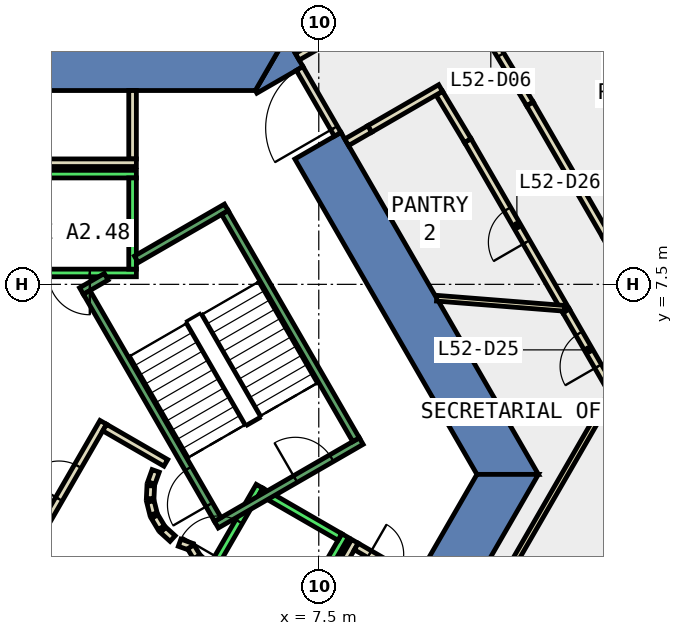
"""IFC4 building model, lengths in metres.
Left out: names, types, materials, properties, quantities, classifications, styles, units other than length and angle.
Written with IfcOpenShell. Run it as: python <this file> out.ifc"""

import sys

from ifc_helpers import new_model, si_unit, direction, frame, frame_2d, origin, place, context, subcontext, project, spatial, polyline, rectangle, outline, extrude, element, fill, save


model = new_model("IFC4")
c1 = context("Model", 3, precision=1e-05, world=origin(), true_north=direction((0.0, 1.0)))
c2 = subcontext(c1, "Body", "Model", "MODEL_VIEW")
j1 = project(units=[si_unit("LENGTHUNIT", "METRE"), si_unit("PLANEANGLEUNIT", "RADIAN")], contexts=[c1])
p1 = place(None, origin())
s1 = spatial("IfcSite", under=j1, at=p1, CompositionType="ELEMENT")
p2 = place(p1, origin())
s2 = spatial("IfcBuilding", under=s1, at=p2, CompositionType="ELEMENT")
p3 = place(p2, frame((0.0, 0.0, 231.8)))
s3 = spatial("IfcBuildingStorey", under=s2, at=p3, CompositionType="ELEMENT", Elevation=231.8)
p4 = place(p3, frame((0.0, 0.0, -0.4)))
e1 = element("IfcWall", 1, at=p4, inside=s3, PredefinedType="SHEAR", context=c2, shape_type="SweptSolid", body=[
    extrude(outline(polyline([(8.084, 11.498), (6.871, 10.798), (11.662, 2.5), (13.279, 2.5), (8.084, 11.498)])), origin(), (0.0, 0.0, 1.0), 4.0),
])
p5 = place(p3, frame((0.0, 0.0, -0.4)))
e2 = element("IfcWall", 2, at=p5, inside=s3, PredefinedType="SHEAR", context=c2, shape_type="SweptSolid", body=[
    extrude(outline(polyline([(5.871, 12.53), (7.084, 13.23), (6.64, 14.0), (5.831, 12.6), (5.871, 12.53)])), origin(), (0.0, 0.0, 1.0), 4.0),
])
p6 = place(p3, frame((0.0, 0.0, -0.4)))
e3 = element("IfcWall", 3, at=p6, inside=s3, PredefinedType="SHEAR", context=c2, shape_type="SweptSolid", body=[
    extrude(outline(polyline([(6.64, 14.0), (-6.64, 14.0), (-5.831, 12.6), (5.831, 12.6), (6.64, 14.0)])), origin(), (0.0, 0.0, 1.0), 4.0),
])
p7 = place(p3, frame((0.0, 0.0, -0.4)))
e4 = element("IfcWall", 4, at=p7, inside=s3, PredefinedType="SHEAR", context=c2, shape_type="SweptSolid", body=[
    extrude(outline(polyline([(6.64, -9.0), (13.279, 2.5), (11.662, 2.5), (5.831, -7.6), (6.64, -9.0)])), origin(), (0.0, 0.0, 1.0), 4.0),
])
p8 = place(p3, frame((15.194, 4.747, 0.0), z_axis=(0.0, 0.0, 1.0), x_axis=(-0.500140598757, 0.865944213836, 0.0)))
e5 = element("IfcWall", 5, at=p8, inside=s3, PredefinedType="PARTITIONING", context=c2, shape_type="SweptSolid", body=[
    extrude(rectangle(XDim=2.375, YDim=0.2, at=frame_2d((1.188, 0.0))), origin(), (0.0, 0.0, 1.0), 3.6),
])
p9 = place(p8, frame((0.688, 0.0, 0.0)))
e6 = element("IfcOpeningElement", 6, at=p9, cuts=e5, PredefinedType="OPENING", context=c2, shape_type="SweptSolid", body=[
    extrude(rectangle(XDim=1.0, YDim=2.1, at=frame_2d((0.5, 1.05))), frame((0.0, 0.11, 0.0), z_axis=(0.0, -1.0, 0.0), x_axis=(1.0, 0.0, 0.0)), (0.0, 0.0, 1.0), 0.22),
])
p10 = place(p3, frame((14.006, 6.804, 0.0), z_axis=(0.0, 0.0, 1.0), x_axis=(-0.500032993936, 0.866006353889, 0.0)))
e7 = element("IfcWall", 7, at=p10, inside=s3, PredefinedType="PARTITIONING", context=c2, shape_type="SweptSolid", body=[
    extrude(rectangle(XDim=5.172, YDim=0.2, at=frame_2d((2.586, 0.0))), origin(), (0.0, 0.0, 1.0), 3.6),
])
p11 = place(p10, frame((2.086, 0.0, 0.0)))
e8 = element("IfcOpeningElement", 8, at=p11, cuts=e7, PredefinedType="OPENING", context=c2, shape_type="SweptSolid", body=[
    extrude(rectangle(XDim=1.0, YDim=2.1, at=frame_2d((0.5, 1.05))), frame((0.0, 0.11, 0.0), z_axis=(0.0, -1.0, 0.0), x_axis=(1.0, 0.0, 0.0)), (0.0, 0.0, 1.0), 0.22),
])
p12 = place(p3, frame((11.42, 11.283, 0.0), z_axis=(0.0, 0.0, 1.0), x_axis=(-0.514890585899, 0.857255903772, 0.0)))
e9 = element("IfcWall", 9, at=p12, inside=s3, PredefinedType="PARTITIONING", context=c2, shape_type="SweptSolid", body=[
    extrude(rectangle(XDim=1.455, YDim=0.2, at=frame_2d((0.728, 0.0))), origin(), (0.0, 0.0, 1.0), 3.6),
])
p13 = place(p3, frame((10.706, 12.666, 0.0), z_axis=(0.0, 0.0, 1.0), x_axis=(-0.865862892194, -0.50028137275, 0.0)))
e10 = element("IfcWall", 10, at=p13, inside=s3, PredefinedType="PARTITIONING", context=c2, shape_type="SweptSolid", body=[
    extrude(rectangle(XDim=2.155, YDim=0.2, at=frame_2d((1.078, 0.0))), origin(), (0.0, 0.0, 1.0), 3.6),
])
p14 = place(p3, frame((6.935, 13.488, 0.0), z_axis=(0.0, 0.0, 1.0), x_axis=(0.866022890907, 0.500004352405, 0.0)))
e11 = element("IfcWall", 11, at=p14, inside=s3, PredefinedType="PARTITIONING", context=c2, shape_type="SweptSolid", body=[
    extrude(rectangle(XDim=0.7, YDim=0.2, at=frame_2d((0.35, 0.0))), origin(), (0.0, 0.0, 1.0), 2.4),
])
p15 = place(p3, frame((10.996, 15.679, 0.0), z_axis=(0.0, 0.0, 1.0), x_axis=(0.514800663461, -0.857309907152, 0.0)))
e12 = element("IfcWall", 12, at=p15, inside=s3, PredefinedType="PARTITIONING", context=c2, shape_type="SweptSolid", body=[
    extrude(rectangle(XDim=4.003, YDim=0.2, at=frame_2d((2.001, 0.0))), origin(), (0.0, 0.0, 1.0), 3.6),
])
p16 = place(p15, frame((1.502, 0.0, 0.0)))
e13 = element("IfcOpeningElement", 13, at=p16, cuts=e12, PredefinedType="OPENING", context=c2, shape_type="SweptSolid", body=[
    extrude(rectangle(XDim=1.0, YDim=2.1, at=frame_2d((0.5, 1.05))), frame((0.0, 0.11, 0.0), z_axis=(0.0, -1.0, 0.0), x_axis=(1.0, 0.0, 0.0)), (0.0, 0.0, 1.0), 0.22),
])
p17 = place(p3, frame((13.057, 12.247, 0.0), z_axis=(0.0, 0.0, 1.0), x_axis=(0.500093699572, -0.865971299552, 0.0)))
e14 = element("IfcWall", 14, at=p17, inside=s3, PredefinedType="PARTITIONING", context=c2, shape_type="SweptSolid", body=[
    extrude(rectangle(XDim=4.004, YDim=0.2, at=frame_2d((2.002, 0.0))), origin(), (0.0, 0.0, 1.0), 3.6),
])
p18 = place(p3, frame((2.6, 12.6, 0.0), z_axis=(0.0, 0.0, 1.0), x_axis=(0.0, -1.0, 0.0)))
e15 = element("IfcWall", 15, at=p18, inside=s3, PredefinedType="PARTITIONING", context=c2, shape_type="SweptSolid", body=[
    extrude(rectangle(XDim=1.8, YDim=0.2, at=frame_2d((0.9, 0.0))), origin(), (0.0, 0.0, 1.0), 3.6),
])
p19 = place(p3, frame((2.7, 10.7, 0.0), z_axis=(0.0, 0.0, 1.0), x_axis=(-1.0, 0.0, 0.0)))
e16 = element("IfcWall", 16, at=p19, inside=s3, PredefinedType="PARTITIONING", context=c2, shape_type="SweptSolid", body=[
    extrude(rectangle(XDim=5.4, YDim=0.2, at=frame_2d((2.7, 0.0))), origin(), (0.0, 0.0, 1.0), 3.6),
])
p20 = place(p3, frame((5.751, -3.938, 0.0), z_axis=(0.0, 0.0, 1.0), x_axis=(0.500034260056, 0.866005622828, 0.0)))
e17 = element("IfcWall", 17, at=p20, inside=s3, PredefinedType="PARTITIONING", context=c2, shape_type="SweptSolid", body=[
    extrude(rectangle(XDim=5.399, YDim=0.2, at=frame_2d((2.7, 0.0))), origin(), (0.0, 0.0, 1.0), 3.6),
])
p21 = place(p3, frame((8.488, 0.602, 0.0), z_axis=(0.0, 0.0, 1.0), x_axis=(0.86585331735, -0.500297944063, 0.0)))
e18 = element("IfcWall", 18, at=p21, inside=s3, PredefinedType="PARTITIONING", context=c2, shape_type="SweptSolid", body=[
    extrude(rectangle(XDim=1.799, YDim=0.2, at=frame_2d((0.9, 0.0))), origin(), (0.0, 0.0, 1.0), 3.6),
])
p22 = place(p21, frame((0.4, 0.0, 0.0)))
e19 = element("IfcOpeningElement", 19, at=p22, cuts=e18, PredefinedType="OPENING", context=c2, shape_type="SweptSolid", body=[
    extrude(rectangle(XDim=0.9, YDim=2.1, at=frame_2d((0.45, 1.05))), frame((0.0, 0.11, 0.0), z_axis=(0.0, -1.0, 0.0), x_axis=(1.0, 0.0, 0.0)), (0.0, 0.0, 1.0), 0.22),
])
p23 = place(p3, frame((10.604, 7.135, 0.0), z_axis=(0.0, 0.0, 1.0), x_axis=(0.996887536909, -0.07883678555, 0.0)))
e20 = element("IfcWall", 20, at=p23, inside=s3, PredefinedType="PARTITIONING", context=c2, shape_type="SweptSolid", body=[
    extrude(rectangle(XDim=3.375, YDim=0.15, at=frame_2d((1.688, 0.0))), origin(), (0.0, 0.0, 1.0), 3.6),
])
p24 = place(p3, frame((0.05, 0.787, 0.0), z_axis=(0.0, 0.0, 1.0), x_axis=(0.499954076797, 0.866051915934, 0.0)))
e21 = element("IfcWall", 21, at=p24, inside=s3, PredefinedType="PARTITIONING", context=c2, shape_type="SweptSolid", body=[
    extrude(rectangle(XDim=3.558, YDim=0.2, at=frame_2d((1.779, 0.0))), origin(), (0.0, 0.0, 1.0), 3.6),
])
p25 = place(p24, frame((1.229, 0.0, 0.0)))
e22 = element("IfcOpeningElement", 22, at=p25, cuts=e21, PredefinedType="OPENING", context=c2, shape_type="SweptSolid", body=[
    extrude(rectangle(XDim=1.0, YDim=2.1, at=frame_2d((0.5, 1.05))), frame((0.0, 0.11, 0.0), z_axis=(0.0, -1.0, 0.0), x_axis=(1.0, 0.0, 0.0)), (0.0, 0.0, 1.0), 0.22),
])
p26 = place(p3, frame((1.866, 3.732, 0.0), z_axis=(0.0, 0.0, 1.0), x_axis=(0.866043361281, -0.499968895414, 0.0)))
e23 = element("IfcWall", 23, at=p26, inside=s3, PredefinedType="PARTITIONING", context=c2, shape_type="SweptSolid", body=[
    extrude(rectangle(XDim=1.858, YDim=0.2, at=frame_2d((0.929, 0.0))), origin(), (0.0, 0.0, 1.0), 3.6),
])
p27 = place(p3, frame((3.208, 2.592, 0.0), z_axis=(0.0, 0.0, 1.0), x_axis=(-0.337388820924, -0.941365382578, 0.0)))
e24 = element("IfcWall", 24, at=p27, inside=s3, PredefinedType="PARTITIONING", context=c2, shape_type="SweptSolid", body=[
    extrude(rectangle(XDim=0.338, YDim=0.2, at=frame_2d((0.169, 0.0))), origin(), (0.0, 0.0, 1.0), 3.6),
])
p28 = place(p3, frame((3.079, 2.199, 0.0), z_axis=(0.0, 0.0, 1.0), x_axis=(-0.047771483479, -0.998858290933, 0.0)))
e25 = element("IfcWall", 25, at=p28, inside=s3, PredefinedType="PARTITIONING", context=c2, shape_type="SweptSolid", body=[
    extrude(rectangle(XDim=0.337, YDim=0.2, at=frame_2d((0.169, 0.0))), origin(), (0.0, 0.0, 1.0), 3.6),
])
p29 = place(p3, frame((3.07, 1.786, 0.0), z_axis=(0.0, 0.0, 1.0), x_axis=(0.242705583207, -0.970099994784, 0.0)))
e26 = element("IfcWall", 26, at=p29, inside=s3, PredefinedType="PARTITIONING", context=c2, shape_type="SweptSolid", body=[
    extrude(rectangle(XDim=0.338, YDim=0.2, at=frame_2d((0.169, 0.0))), origin(), (0.0, 0.0, 1.0), 3.6),
])
for number, where, z_axis, x_axis in (
    (27, (3.182, 1.388, 0.0), (0.0, 0.0, 1.0), (0.512, -0.859, 0.0)),
    (28, (3.404, 1.039, 0.0), (0.0, 0.0, 1.0), (0.74, -0.672, 0.0)),
):
    element("IfcWall", number, at=place(p3, frame(where, z_axis=z_axis, x_axis=x_axis)), inside=s3, PredefinedType="PARTITIONING", context=c2, shape_type="SweptSolid", body=[
        extrude(rectangle(XDim=0.338, YDim=0.2, at=frame_2d((0.169, 0.0))), origin(), (0.0, 0.0, 1.0), 3.6),
    ])
p30 = place(p3, frame((3.838, 0.702, 0.0), z_axis=(0.0, 0.0, 1.0), x_axis=(0.941035081519, -0.338308993895, 0.0)))
e29 = element("IfcWall", 29, at=p30, inside=s3, PredefinedType="PARTITIONING", context=c2, shape_type="SweptSolid", body=[
    extrude(rectangle(XDim=0.337, YDim=0.2, at=frame_2d((0.168, 0.0))), origin(), (0.0, 0.0, 1.0), 3.6),
])
p31 = place(p3, frame((4.132, 0.593, 0.0), z_axis=(0.0, 0.0, 1.0), x_axis=(0.513561617048, -0.858052717201, 0.0)))
e30 = element("IfcWall", 30, at=p31, inside=s3, PredefinedType="PARTITIONING", context=c2, shape_type="SweptSolid", body=[
    extrude(rectangle(XDim=0.308, YDim=0.2, at=frame_2d((0.154, 0.0))), origin(), (0.0, 0.0, 1.0), 3.6),
])
p32 = place(p3, frame((4.301, 0.315, 0.0), z_axis=(0.0, 0.0, 1.0), x_axis=(0.741798017506, -0.670623367639, 0.0)))
e31 = element("IfcWall", 31, at=p32, inside=s3, PredefinedType="PARTITIONING", context=c2, shape_type="SweptSolid", body=[
    extrude(rectangle(XDim=0.309, YDim=0.2, at=frame_2d((0.154, 0.0))), origin(), (0.0, 0.0, 1.0), 3.6),
])
p33 = place(p3, frame((7.997, 11.448, 0.0), z_axis=(0.0, 0.0, 1.0), x_axis=(-0.50002537861, 0.866010750942, 0.0)))
e32 = element("IfcWall", 32, at=p33, inside=s3, PredefinedType="PARTITIONING", context=c2, shape_type="SweptSolid", body=[
    extrude(rectangle(XDim=2.0, YDim=0.2, at=frame_2d((1.0, 0.0))), origin(), (0.0, 0.0, 1.0), 2.4),
])
p34 = place(p33, frame((0.19, 0.0, 0.0)))
e33 = element("IfcOpeningElement", 33, at=p34, cuts=e32, PredefinedType="OPENING", context=c2, shape_type="SweptSolid", body=[
    extrude(rectangle(XDim=1.8, YDim=2.1, at=frame_2d((0.9, 1.05))), frame((0.0, 0.11, 0.0), z_axis=(0.0, -1.0, 0.0), x_axis=(1.0, 0.0, 0.0)), (0.0, 0.0, 1.0), 0.22),
])
p35 = place(p3, frame((9.597, -5.079, 0.0), z_axis=(0.0, 0.0, 1.0), x_axis=(0.499949193323, 0.866054735046, 0.0)))
e34 = element("IfcWall", 34, at=p35, inside=s3, PredefinedType="PARTITIONING", context=c2, shape_type="SweptSolid", body=[
    extrude(rectangle(XDim=11.371, YDim=0.15, at=frame_2d((5.686, 0.0))), origin(), (0.0, 0.0, 1.0), 3.6),
])
p36 = place(p3, frame((8.84, 11.588, 0.0), z_axis=(0.0, 0.0, 1.0), x_axis=(-0.866110083249, -0.499853302173, 0.0)))
e35 = element("IfcWall", 35, at=p36, inside=s3, PredefinedType="PARTITIONING", context=c2, shape_type="SweptSolid", body=[
    extrude(rectangle(XDim=0.7, YDim=0.2, at=frame_2d((0.35, 0.0))), origin(), (0.0, 0.0, 1.0), 2.4),
])
p37 = place(p3, frame((2.7, 7.8, 0.0), z_axis=(0.0, 0.0, 1.0), x_axis=(-1.0, 0.0, 0.0)))
e36 = element("IfcWall", 36, at=p37, inside=s3, PredefinedType="STANDARD", context=c2, shape_type="SweptSolid", body=[
    extrude(rectangle(XDim=5.4, YDim=0.2, at=frame_2d((2.7, 0.0))), origin(), (0.0, 0.0, 1.0), 3.6),
])
p38 = place(p37, frame((1.225, 0.0, 0.0)))
e37 = element("IfcOpeningElement", 37, at=p38, cuts=e36, PredefinedType="OPENING", context=c2, shape_type="SweptSolid", body=[
    extrude(rectangle(XDim=1.1, YDim=2.1, at=frame_2d((0.55, 1.05))), frame((0.0, 0.11, 0.0), z_axis=(0.0, -1.0, 0.0), x_axis=(1.0, 0.0, 0.0)), (0.0, 0.0, 1.0), 0.22),
])
p39 = place(p37, frame((3.075, 0.0, 0.0)))
e38 = element("IfcOpeningElement", 38, at=p39, cuts=e36, PredefinedType="OPENING", context=c2, shape_type="SweptSolid", body=[
    extrude(rectangle(XDim=1.1, YDim=2.1, at=frame_2d((0.55, 1.05))), frame((0.0, 0.11, 0.0), z_axis=(0.0, -1.0, 0.0), x_axis=(1.0, 0.0, 0.0)), (0.0, 0.0, 1.0), 0.22),
])
p40 = place(p3, frame((2.7, 10.4, 0.0), z_axis=(0.0, 0.0, 1.0), x_axis=(-1.0, 0.0, 0.0)))
e39 = element("IfcWall", 39, at=p40, inside=s3, PredefinedType="STANDARD", context=c2, shape_type="SweptSolid", body=[
    extrude(rectangle(XDim=5.4, YDim=0.2, at=frame_2d((2.7, 0.0))), origin(), (0.0, 0.0, 1.0), 3.6),
])
p41 = place(p3, frame((2.6, 7.9, 0.0), z_axis=(0.0, 0.0, 1.0), x_axis=(0.0, 1.0, 0.0)))
e40 = element("IfcWall", 40, at=p41, inside=s3, PredefinedType="STANDARD", context=c2, shape_type="SweptSolid", body=[
    extrude(rectangle(XDim=2.4, YDim=0.2, at=frame_2d((1.2, 0.0))), origin(), (0.0, 0.0, 1.0), 3.6),
])
p42 = place(p3, frame((3.24, -2.488, 0.0), z_axis=(0.0, 0.0, 1.0), x_axis=(0.500034260056, 0.866005622828, 0.0)))
e41 = element("IfcWall", 41, at=p42, inside=s3, PredefinedType="STANDARD", context=c2, shape_type="SweptSolid", body=[
    extrude(rectangle(XDim=5.399, YDim=0.2, at=frame_2d((2.7, 0.0))), origin(), (0.0, 0.0, 1.0), 3.6),
])
p43 = place(p42, frame((3.225, 0.0, 0.0)))
e42 = element("IfcOpeningElement", 42, at=p43, cuts=e41, PredefinedType="OPENING", context=c2, shape_type="SweptSolid", body=[
    extrude(rectangle(XDim=1.1, YDim=2.1, at=frame_2d((0.55, 1.05))), frame((0.0, 0.11, 0.0), z_axis=(0.0, -1.0, 0.0), x_axis=(1.0, 0.0, 0.0)), (0.0, 0.0, 1.0), 0.22),
])
p44 = place(p42, frame((1.225, 0.0, 0.0)))
e43 = element("IfcOpeningElement", 43, at=p44, cuts=e41, PredefinedType="OPENING", context=c2, shape_type="SweptSolid", body=[
    extrude(rectangle(XDim=1.1, YDim=2.1, at=frame_2d((0.55, 1.05))), frame((0.0, 0.11, 0.0), z_axis=(0.0, -1.0, 0.0), x_axis=(1.0, 0.0, 0.0)), (0.0, 0.0, 1.0), 0.22),
])
p45 = place(p3, frame((5.492, -3.788, 0.0), z_axis=(0.0, 0.0, 1.0), x_axis=(0.500034260056, 0.866005622828, 0.0)))
e44 = element("IfcWall", 44, at=p45, inside=s3, PredefinedType="STANDARD", context=c2, shape_type="SweptSolid", body=[
    extrude(rectangle(XDim=5.399, YDim=0.2, at=frame_2d((2.7, 0.0))), origin(), (0.0, 0.0, 1.0), 3.6),
])
p46 = place(p3, frame((5.977, 2.052, 0.0), z_axis=(0.0, 0.0, 1.0), x_axis=(0.865973769406, -0.500089422704, 0.0)))
e45 = element("IfcWall", 45, at=p46, inside=s3, PredefinedType="STANDARD", context=c2, shape_type="SweptSolid", body=[
    extrude(rectangle(XDim=2.399, YDim=0.2, at=frame_2d((1.2, 0.0))), origin(), (0.0, 0.0, 1.0), 3.6),
])
p47 = place(p3, frame((4.806, 1.176, 0.0), z_axis=(0.0, 0.0, 1.0), x_axis=(0.866059941101, 0.499940174841, 0.0)))
e46 = element("IfcWall", 46, at=p47, inside=s3, PredefinedType="STANDARD", context=c2, shape_type="SweptSolid", body=[
    extrude(rectangle(XDim=4.4, YDim=0.2, at=frame_2d((2.2, 0.0))), origin(), (0.0, 0.0, 1.0), 3.6),
])
p48 = place(p47, frame((2.4, 0.0, 0.0)))
e47 = element("IfcOpeningElement", 47, at=p48, cuts=e46, PredefinedType="OPENING", context=c2, shape_type="SweptSolid", body=[
    extrude(rectangle(XDim=1.1, YDim=2.2, at=frame_2d((0.55, 1.1))), frame((0.0, 0.11, 0.0), z_axis=(0.0, -1.0, 0.0), x_axis=(1.0, 0.0, 0.0)), (0.0, 0.0, 1.0), 0.22),
])
p49 = place(p3, frame((2.7, 8.158, 0.0), z_axis=(0.0, 0.0, 1.0), x_axis=(0.86611865017, 0.499838457731, 0.0)))
e48 = element("IfcWall", 48, at=p49, inside=s3, PredefinedType="STANDARD", context=c2, shape_type="SweptSolid", body=[
    extrude(rectangle(XDim=2.733, YDim=0.2, at=frame_2d((1.366, 0.0))), origin(), (0.0, 0.0, 1.0), 3.6),
])
p50 = place(p3, frame((1.256, 7.324, 0.0), z_axis=(0.0, 0.0, 1.0), x_axis=(0.865915093549, 0.500191014278, 0.0)))
e49 = element("IfcWall", 49, at=p50, inside=s3, PredefinedType="STANDARD", context=c2, shape_type="SweptSolid", body=[
    extrude(rectangle(XDim=0.752, YDim=0.2, at=frame_2d((0.376, 0.0))), origin(), (0.0, 0.0, 1.0), 3.6),
])
p51 = place(p3, frame((4.843, 1.312, 0.0), z_axis=(0.0, 0.0, 1.0), x_axis=(-0.499963383562, 0.866046543262, 0.0)))
e50 = element("IfcWall", 50, at=p51, inside=s3, PredefinedType="STANDARD", context=c2, shape_type="SweptSolid", body=[
    extrude(rectangle(XDim=6.9, YDim=0.2, at=frame_2d((3.45, 0.0))), origin(), (0.0, 0.0, 1.0), 3.6),
])
p52 = place(p51, frame((0.45, 0.0, 0.0)))
e51 = element("IfcOpeningElement", 51, at=p52, cuts=e50, PredefinedType="OPENING", context=c2, shape_type="SweptSolid", body=[
    extrude(rectangle(XDim=1.1, YDim=2.2, at=frame_2d((0.55, 1.1))), frame((0.0, 0.11, 0.0), z_axis=(0.0, -1.0, 0.0), x_axis=(1.0, 0.0, 0.0)), (0.0, 0.0, 1.0), 0.22),
])
p53 = place(p3, frame((8.48, 3.412, 0.0), z_axis=(0.0, 0.0, 1.0), x_axis=(-0.499978703459, 0.866037698999, 0.0)))
e52 = element("IfcWall", 52, at=p53, inside=s3, PredefinedType="STANDARD", context=c2, shape_type="SweptSolid", body=[
    extrude(rectangle(XDim=6.9, YDim=0.2, at=frame_2d((3.45, 0.0))), origin(), (0.0, 0.0, 1.0), 3.6),
])
p54 = place(p16, origin())
e53 = element("IfcDoor", 53, at=p54, inside=s3, OperationType="SINGLE_SWING_LEFT", PredefinedType="DOOR", context=c2, shape_type="SweptSolid", body=[
    extrude(rectangle(XDim=1.0, YDim=2.1, at=frame_2d((0.5, 1.05))), frame((0.0, 0.025, 0.0), z_axis=(0.0, -1.0, 0.0), x_axis=(1.0, 0.0, 0.0)), (0.0, 0.0, 1.0), 0.05),
])
fill(e13, e53)
p55 = place(p9, origin())
e54 = element("IfcDoor", 54, at=p55, inside=s3, OperationType="SINGLE_SWING_LEFT", PredefinedType="DOOR", context=c2, shape_type="SweptSolid", body=[
    extrude(rectangle(XDim=1.0, YDim=2.1, at=frame_2d((0.5, 1.05))), frame((0.0, 0.025, 0.0), z_axis=(0.0, -1.0, 0.0), x_axis=(1.0, 0.0, 0.0)), (0.0, 0.0, 1.0), 0.05),
])
fill(e6, e54)
p56 = place(p11, origin())
e55 = element("IfcDoor", 55, at=p56, inside=s3, OperationType="SINGLE_SWING_LEFT", PredefinedType="DOOR", context=c2, shape_type="SweptSolid", body=[
    extrude(rectangle(XDim=1.0, YDim=2.1, at=frame_2d((0.5, 1.05))), frame((0.0, 0.025, 0.0), z_axis=(0.0, -1.0, 0.0), x_axis=(1.0, 0.0, 0.0)), (0.0, 0.0, 1.0), 0.05),
])
fill(e8, e55)
p57 = place(p25, origin())
e56 = element("IfcDoor", 56, at=p57, inside=s3, OperationType="SINGLE_SWING_RIGHT", PredefinedType="DOOR", context=c2, shape_type="SweptSolid", body=[
    extrude(rectangle(XDim=1.0, YDim=2.1, at=frame_2d((0.5, 1.05))), frame((0.0, 0.025, 0.0), z_axis=(0.0, -1.0, 0.0), x_axis=(1.0, 0.0, 0.0)), (0.0, 0.0, 1.0), 0.05),
])
fill(e22, e56)
p58 = place(p22, origin())
e57 = element("IfcDoor", 57, at=p58, inside=s3, OperationType="SINGLE_SWING_RIGHT", PredefinedType="DOOR", context=c2, shape_type="SweptSolid", body=[
    extrude(rectangle(XDim=0.9, YDim=2.1, at=frame_2d((0.45, 1.05))), frame((0.0, 0.025, 0.0), z_axis=(0.0, -1.0, 0.0), x_axis=(1.0, 0.0, 0.0)), (0.0, 0.0, 1.0), 0.05),
])
fill(e19, e57)
p59 = place(p34, origin())
e58 = element("IfcDoor", 58, at=p59, inside=s3, OperationType="DOUBLE_DOOR_SINGLE_SWING", PredefinedType="DOOR", context=c2, shape_type="SweptSolid", body=[
    extrude(rectangle(XDim=1.8, YDim=2.1, at=frame_2d((0.9, 1.05))), frame((0.0, 0.025, 0.0), z_axis=(0.0, -1.0, 0.0), x_axis=(1.0, 0.0, 0.0)), (0.0, 0.0, 1.0), 0.05),
])
fill(e33, e58)
p60 = place(p38, origin())
e59 = element("IfcDoor", 59, at=p60, inside=s3, OperationType="SLIDING_TO_LEFT", PredefinedType="DOOR", context=c2, shape_type="SweptSolid", body=[
    extrude(rectangle(XDim=1.1, YDim=2.1, at=frame_2d((0.55, 1.05))), frame((0.0, 0.025, 0.0), z_axis=(0.0, -1.0, 0.0), x_axis=(1.0, 0.0, 0.0)), (0.0, 0.0, 1.0), 0.05),
])
fill(e37, e59)
p61 = place(p43, origin())
e60 = element("IfcDoor", 60, at=p61, inside=s3, OperationType="SLIDING_TO_LEFT", PredefinedType="DOOR", context=c2, shape_type="SweptSolid", body=[
    extrude(rectangle(XDim=1.1, YDim=2.1, at=frame_2d((0.55, 1.05))), frame((0.0, 0.025, 0.0), z_axis=(0.0, -1.0, 0.0), x_axis=(1.0, 0.0, 0.0)), (0.0, 0.0, 1.0), 0.05),
])
fill(e42, e60)
p62 = place(p52, origin())
e61 = element("IfcDoor", 61, at=p62, inside=s3, OperationType="SINGLE_SWING_LEFT", PredefinedType="DOOR", context=c2, shape_type="SweptSolid", body=[
    extrude(rectangle(XDim=1.1, YDim=2.2, at=frame_2d((0.55, 1.1))), frame((0.0, 0.025, 0.0), z_axis=(0.0, -1.0, 0.0), x_axis=(1.0, 0.0, 0.0)), (0.0, 0.0, 1.0), 0.05),
])
fill(e51, e61)
p63 = place(p48, origin())
e62 = element("IfcDoor", 62, at=p63, inside=s3, OperationType="SINGLE_SWING_LEFT", PredefinedType="DOOR", context=c2, shape_type="SweptSolid", body=[
    extrude(rectangle(XDim=1.1, YDim=2.2, at=frame_2d((0.55, 1.1))), frame((0.0, 0.025, 0.0), z_axis=(0.0, -1.0, 0.0), x_axis=(1.0, 0.0, 0.0)), (0.0, 0.0, 1.0), 0.05),
])
fill(e47, e62)
save(model, sys.argv[1])
